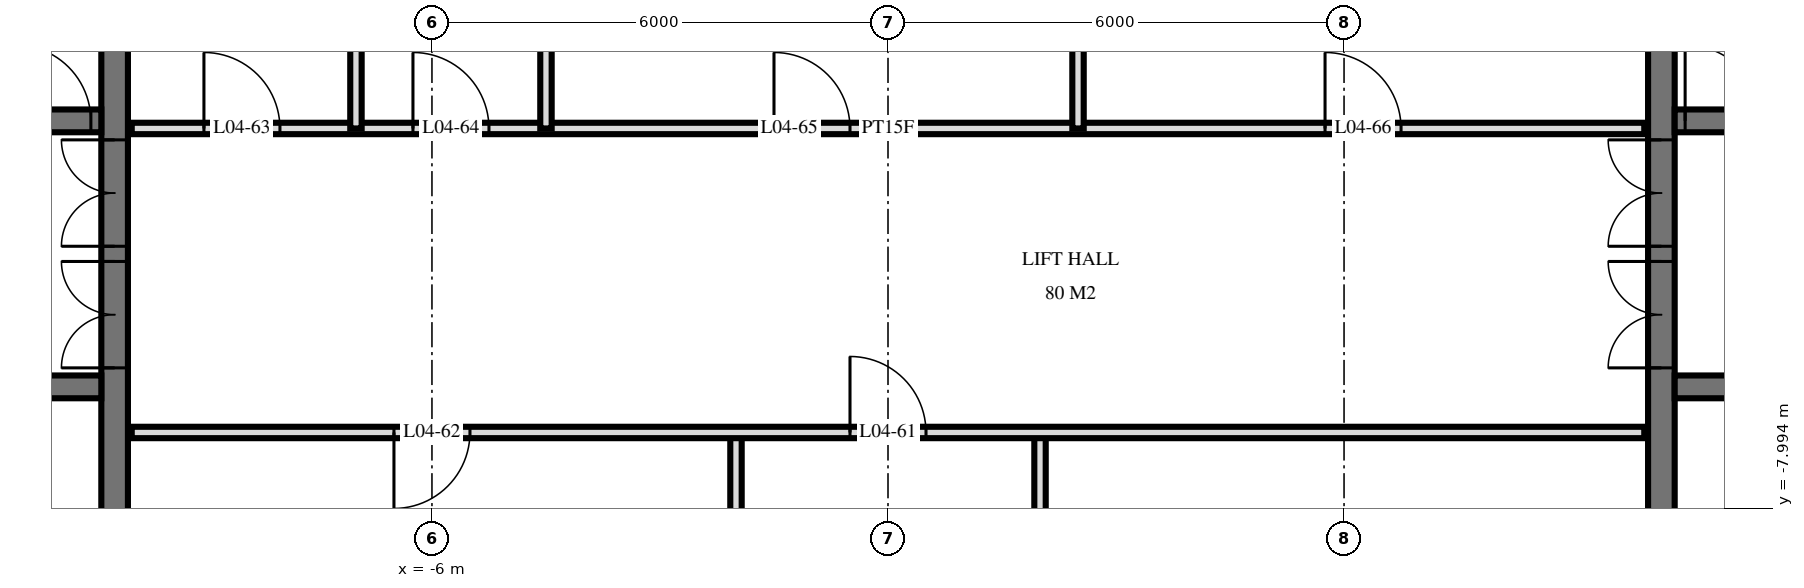
"""IFC4 building model, lengths in metres.
Left out: names, types, materials, properties, quantities, classifications, styles, units other than length and angle.
Written with IfcOpenShell. Run it as: python <this file> out.ifc"""

import sys

from ifc_helpers import new_model, si_unit, direction, frame, frame_2d, origin, place, context, subcontext, project, spatial, rectangle, extrude, element, fill, save


model = new_model("IFC4")
c1 = context("Model", 3, precision=1e-05, world=origin(), true_north=direction((0.0, 1.0)))
c2 = subcontext(c1, "Body", "Model", "MODEL_VIEW")
j1 = project(units=[si_unit("LENGTHUNIT", "METRE"), si_unit("PLANEANGLEUNIT", "RADIAN")], contexts=[c1])
p1 = place(None, origin())
s1 = spatial("IfcSite", under=j1, at=p1, CompositionType="ELEMENT")
p2 = place(p1, origin())
s2 = spatial("IfcBuilding", under=s1, at=p2, CompositionType="ELEMENT")
p3 = place(p2, frame((0.0, 0.0, 24.0)))
s3 = spatial("IfcBuildingStorey", under=s2, at=p3, CompositionType="ELEMENT", Elevation=24.0)
p4 = place(p3, frame((-10.175, -14.55, 0.0), z_axis=(0.0, 0.0, 1.0), x_axis=(0.0, 1.0, 0.0)))
e1 = element("IfcWall", 1, at=p4, inside=s3, PredefinedType="SHEAR", context=c2, shape_type="SweptSolid", body=[
    extrude(rectangle(XDim=14.1, YDim=0.35, at=frame_2d((7.05, 0.0))), origin(), (0.0, 0.0, 1.0), 3.6),
])
p5 = place(p4, frame((8.4, 0.0, 0.0)))
e2 = element("IfcOpeningElement", 2, at=p5, cuts=e1, PredefinedType="OPENING", context=c2, shape_type="SweptSolid", body=[
    extrude(rectangle(XDim=1.4, YDim=2.4, at=frame_2d((0.7, 1.2))), frame((0.0, 0.185, 0.0), z_axis=(0.0, -1.0, 0.0), x_axis=(1.0, 0.0, 0.0)), (0.0, 0.0, 1.0), 0.37),
])
p6 = place(p4, frame((10.0, 0.0, 0.0)))
e3 = element("IfcOpeningElement", 3, at=p6, cuts=e1, PredefinedType="OPENING", context=c2, shape_type="SweptSolid", body=[
    extrude(rectangle(XDim=1.4, YDim=2.4, at=frame_2d((0.7, 1.2))), frame((0.0, 0.185, 0.0), z_axis=(0.0, -1.0, 0.0), x_axis=(1.0, 0.0, 0.0)), (0.0, 0.0, 1.0), 0.37),
])
p7 = place(p4, frame((4.0, 0.0, 0.0)))
e4 = element("IfcOpeningElement", 4, at=p7, cuts=e1, PredefinedType="OPENING", context=c2, shape_type="SweptSolid", body=[
    extrude(rectangle(XDim=1.2, YDim=2.1, at=frame_2d((0.6, 1.05))), frame((0.0, 0.185, 0.0), z_axis=(0.0, -1.0, 0.0), x_axis=(1.0, 0.0, 0.0)), (0.0, 0.0, 1.0), 0.37),
])
p8 = place(p3, frame((-29.05, -2.9, 0.0), z_axis=(0.0, 0.0, 1.0), x_axis=(1.0, 0.0, 0.0)))
e5 = element("IfcWall", 5, at=p8, inside=s3, PredefinedType="SHEAR", context=c2, shape_type="SweptSolid", body=[
    extrude(rectangle(XDim=18.7, YDim=0.3, at=frame_2d((9.35, 0.0))), origin(), (0.0, 0.0, 1.0), 3.6),
])
p9 = place(p8, frame((2.95, 0.0, 0.0)))
e6 = element("IfcOpeningElement", 6, at=p9, cuts=e5, PredefinedType="OPENING", context=c2, shape_type="SweptSolid", body=[
    extrude(rectangle(XDim=1.1, YDim=2.1, at=frame_2d((0.55, 1.05))), frame((0.0, 0.16, 0.0), z_axis=(0.0, -1.0, 0.0), x_axis=(1.0, 0.0, 0.0)), (0.0, 0.0, 1.0), 0.32),
])
p10 = place(p8, frame((0.55, 0.0, 0.0)))
e7 = element("IfcOpeningElement", 7, at=p10, cuts=e5, PredefinedType="OPENING", context=c2, shape_type="SweptSolid", body=[
    extrude(rectangle(XDim=1.1, YDim=2.1, at=frame_2d((0.55, 1.05))), frame((0.0, 0.16, 0.0), z_axis=(0.0, -1.0, 0.0), x_axis=(1.0, 0.0, 0.0)), (0.0, 0.0, 1.0), 0.32),
])
p11 = place(p8, frame((11.613, 0.0, 0.0)))
e8 = element("IfcOpeningElement", 8, at=p11, cuts=e5, PredefinedType="OPENING", context=c2, shape_type="SweptSolid", body=[
    extrude(rectangle(XDim=0.9, YDim=2.1, at=frame_2d((0.45, 1.05))), frame((0.0, 0.16, 0.0), z_axis=(0.0, -1.0, 0.0), x_axis=(1.0, 0.0, 0.0)), (0.0, 0.0, 1.0), 0.32),
])
p12 = place(p8, frame((10.188, 0.0, 0.0)))
e9 = element("IfcOpeningElement", 9, at=p12, cuts=e5, PredefinedType="OPENING", context=c2, shape_type="SweptSolid", body=[
    extrude(rectangle(XDim=0.9, YDim=2.1, at=frame_2d((0.45, 1.05))), frame((0.0, 0.16, 0.0), z_axis=(0.0, -1.0, 0.0), x_axis=(1.0, 0.0, 0.0)), (0.0, 0.0, 1.0), 0.32),
])
p13 = place(p8, frame((17.562, 0.0, 0.0)))
e10 = element("IfcOpeningElement", 10, at=p13, cuts=e5, PredefinedType="OPENING", context=c2, shape_type="SweptSolid", body=[
    extrude(rectangle(XDim=1.0, YDim=2.1, at=frame_2d((0.5, 1.05))), frame((0.0, 0.16, 0.0), z_axis=(0.0, -1.0, 0.0), x_axis=(1.0, 0.0, 0.0)), (0.0, 0.0, 1.0), 0.32),
])
p14 = place(p8, frame((16.137, 0.0, 0.0)))
e11 = element("IfcOpeningElement", 11, at=p14, cuts=e5, PredefinedType="OPENING", context=c2, shape_type="SweptSolid", body=[
    extrude(rectangle(XDim=1.0, YDim=2.1, at=frame_2d((0.5, 1.05))), frame((0.0, 0.16, 0.0), z_axis=(0.0, -1.0, 0.0), x_axis=(1.0, 0.0, 0.0)), (0.0, 0.0, 1.0), 0.32),
])
p15 = place(p8, frame((13.85, 0.0, 0.0)))
e12 = element("IfcOpeningElement", 12, at=p15, cuts=e5, PredefinedType="OPENING", context=c2, shape_type="SweptSolid", body=[
    extrude(rectangle(XDim=1.0, YDim=2.1, at=frame_2d((0.5, 1.05))), frame((0.0, 0.16, 0.0), z_axis=(0.0, -1.0, 0.0), x_axis=(1.0, 0.0, 0.0)), (0.0, 0.0, 1.0), 0.32),
])
p16 = place(p8, frame((5.6, 0.0, 0.0)))
e13 = element("IfcOpeningElement", 13, at=p16, cuts=e5, PredefinedType="OPENING", context=c2, shape_type="SweptSolid", body=[
    extrude(rectangle(XDim=1.0, YDim=2.1, at=frame_2d((0.5, 1.05))), frame((0.0, 0.16, 0.0), z_axis=(0.0, -1.0, 0.0), x_axis=(1.0, 0.0, 0.0)), (0.0, 0.0, 1.0), 0.32),
])
p17 = place(p3, frame((-29.05, -6.4, 0.0), z_axis=(0.0, 0.0, 1.0), x_axis=(1.0, 0.0, 0.0)))
e14 = element("IfcWall", 14, at=p17, inside=s3, PredefinedType="SHEAR", context=c2, shape_type="SweptSolid", body=[
    extrude(rectangle(XDim=18.7, YDim=0.3, at=frame_2d((9.35, 0.0))), origin(), (0.0, 0.0, 1.0), 3.6),
])
p18 = place(p17, frame((2.95, 0.0, 0.0)))
e15 = element("IfcOpeningElement", 15, at=p18, cuts=e14, PredefinedType="OPENING", context=c2, shape_type="SweptSolid", body=[
    extrude(rectangle(XDim=1.1, YDim=2.1, at=frame_2d((0.55, 1.05))), frame((0.0, 0.16, 0.0), z_axis=(0.0, -1.0, 0.0), x_axis=(1.0, 0.0, 0.0)), (0.0, 0.0, 1.0), 0.32),
])
p19 = place(p17, frame((0.55, 0.0, 0.0)))
e16 = element("IfcOpeningElement", 16, at=p19, cuts=e14, PredefinedType="OPENING", context=c2, shape_type="SweptSolid", body=[
    extrude(rectangle(XDim=1.1, YDim=2.1, at=frame_2d((0.55, 1.05))), frame((0.0, 0.16, 0.0), z_axis=(0.0, -1.0, 0.0), x_axis=(1.0, 0.0, 0.0)), (0.0, 0.0, 1.0), 0.32),
])
p20 = place(p17, frame((10.8, 0.0, 0.0)))
e17 = element("IfcOpeningElement", 17, at=p20, cuts=e14, PredefinedType="OPENING", context=c2, shape_type="SweptSolid", body=[
    extrude(rectangle(XDim=1.1, YDim=2.1, at=frame_2d((0.55, 1.05))), frame((0.0, 0.16, 0.0), z_axis=(0.0, -1.0, 0.0), x_axis=(1.0, 0.0, 0.0)), (0.0, 0.0, 1.0), 0.32),
])
p21 = place(p17, frame((5.6, 0.0, 0.0)))
e18 = element("IfcOpeningElement", 18, at=p21, cuts=e14, PredefinedType="OPENING", context=c2, shape_type="SweptSolid", body=[
    extrude(rectangle(XDim=1.0, YDim=2.1, at=frame_2d((0.5, 1.05))), frame((0.0, 0.16, 0.0), z_axis=(0.0, -1.0, 0.0), x_axis=(1.0, 0.0, 0.0)), (0.0, 0.0, 1.0), 0.32),
])
p22 = place(p3, frame((10.175, -14.55, 0.0), z_axis=(0.0, 0.0, 1.0), x_axis=(0.0, 1.0, 0.0)))
e19 = element("IfcWall", 19, at=p22, inside=s3, PredefinedType="SHEAR", context=c2, shape_type="SweptSolid", body=[
    extrude(rectangle(XDim=14.1, YDim=0.35, at=frame_2d((7.05, 0.0))), origin(), (0.0, 0.0, 1.0), 3.6),
])
p23 = place(p22, frame((8.4, 0.0, 0.0)))
e20 = element("IfcOpeningElement", 20, at=p23, cuts=e19, PredefinedType="OPENING", context=c2, shape_type="SweptSolid", body=[
    extrude(rectangle(XDim=1.4, YDim=2.4, at=frame_2d((0.7, 1.2))), frame((0.0, 0.185, 0.0), z_axis=(0.0, -1.0, 0.0), x_axis=(1.0, 0.0, 0.0)), (0.0, 0.0, 1.0), 0.37),
])
p24 = place(p22, frame((10.0, 0.0, 0.0)))
e21 = element("IfcOpeningElement", 21, at=p24, cuts=e19, PredefinedType="OPENING", context=c2, shape_type="SweptSolid", body=[
    extrude(rectangle(XDim=1.4, YDim=2.4, at=frame_2d((0.7, 1.2))), frame((0.0, 0.185, 0.0), z_axis=(0.0, -1.0, 0.0), x_axis=(1.0, 0.0, 0.0)), (0.0, 0.0, 1.0), 0.37),
])
p25 = place(p22, frame((4.0, 0.0, 0.0)))
e22 = element("IfcOpeningElement", 22, at=p25, cuts=e19, PredefinedType="OPENING", context=c2, shape_type="SweptSolid", body=[
    extrude(rectangle(XDim=1.2, YDim=2.1, at=frame_2d((0.6, 1.05))), frame((0.0, 0.185, 0.0), z_axis=(0.0, -1.0, 0.0), x_axis=(1.0, 0.0, 0.0)), (0.0, 0.0, 1.0), 0.37),
])
p26 = place(p3, frame((10.35, -2.9, 0.0), z_axis=(0.0, 0.0, 1.0), x_axis=(1.0, 0.0, 0.0)))
e23 = element("IfcWall", 23, at=p26, inside=s3, PredefinedType="SHEAR", context=c2, shape_type="SweptSolid", body=[
    extrude(rectangle(XDim=18.7, YDim=0.3, at=frame_2d((9.35, 0.0))), origin(), (0.0, 0.0, 1.0), 3.6),
])
p27 = place(p26, frame((14.65, 0.0, 0.0)))
e24 = element("IfcOpeningElement", 24, at=p27, cuts=e23, PredefinedType="OPENING", context=c2, shape_type="SweptSolid", body=[
    extrude(rectangle(XDim=1.1, YDim=2.1, at=frame_2d((0.55, 1.05))), frame((0.0, 0.16, 0.0), z_axis=(0.0, -1.0, 0.0), x_axis=(1.0, 0.0, 0.0)), (0.0, 0.0, 1.0), 0.32),
])
p28 = place(p26, frame((17.05, 0.0, 0.0)))
e25 = element("IfcOpeningElement", 25, at=p28, cuts=e23, PredefinedType="OPENING", context=c2, shape_type="SweptSolid", body=[
    extrude(rectangle(XDim=1.1, YDim=2.1, at=frame_2d((0.55, 1.05))), frame((0.0, 0.16, 0.0), z_axis=(0.0, -1.0, 0.0), x_axis=(1.0, 0.0, 0.0)), (0.0, 0.0, 1.0), 0.32),
])
p29 = place(p26, frame((6.188, 0.0, 0.0)))
e26 = element("IfcOpeningElement", 26, at=p29, cuts=e23, PredefinedType="OPENING", context=c2, shape_type="SweptSolid", body=[
    extrude(rectangle(XDim=0.9, YDim=2.1, at=frame_2d((0.45, 1.05))), frame((0.0, 0.16, 0.0), z_axis=(0.0, -1.0, 0.0), x_axis=(1.0, 0.0, 0.0)), (0.0, 0.0, 1.0), 0.32),
])
p30 = place(p26, frame((7.613, 0.0, 0.0)))
e27 = element("IfcOpeningElement", 27, at=p30, cuts=e23, PredefinedType="OPENING", context=c2, shape_type="SweptSolid", body=[
    extrude(rectangle(XDim=0.9, YDim=2.1, at=frame_2d((0.45, 1.05))), frame((0.0, 0.16, 0.0), z_axis=(0.0, -1.0, 0.0), x_axis=(1.0, 0.0, 0.0)), (0.0, 0.0, 1.0), 0.32),
])
p31 = place(p26, frame((0.137, 0.0, 0.0)))
e28 = element("IfcOpeningElement", 28, at=p31, cuts=e23, PredefinedType="OPENING", context=c2, shape_type="SweptSolid", body=[
    extrude(rectangle(XDim=1.0, YDim=2.1, at=frame_2d((0.5, 1.05))), frame((0.0, 0.16, 0.0), z_axis=(0.0, -1.0, 0.0), x_axis=(1.0, 0.0, 0.0)), (0.0, 0.0, 1.0), 0.32),
])
p32 = place(p26, frame((1.562, 0.0, 0.0)))
e29 = element("IfcOpeningElement", 29, at=p32, cuts=e23, PredefinedType="OPENING", context=c2, shape_type="SweptSolid", body=[
    extrude(rectangle(XDim=1.0, YDim=2.1, at=frame_2d((0.5, 1.05))), frame((0.0, 0.16, 0.0), z_axis=(0.0, -1.0, 0.0), x_axis=(1.0, 0.0, 0.0)), (0.0, 0.0, 1.0), 0.32),
])
p33 = place(p26, frame((3.85, 0.0, 0.0)))
e30 = element("IfcOpeningElement", 30, at=p33, cuts=e23, PredefinedType="OPENING", context=c2, shape_type="SweptSolid", body=[
    extrude(rectangle(XDim=1.0, YDim=2.1, at=frame_2d((0.5, 1.05))), frame((0.0, 0.16, 0.0), z_axis=(0.0, -1.0, 0.0), x_axis=(1.0, 0.0, 0.0)), (0.0, 0.0, 1.0), 0.32),
])
p34 = place(p26, frame((12.1, 0.0, 0.0)))
e31 = element("IfcOpeningElement", 31, at=p34, cuts=e23, PredefinedType="OPENING", context=c2, shape_type="SweptSolid", body=[
    extrude(rectangle(XDim=1.0, YDim=2.1, at=frame_2d((0.5, 1.05))), frame((0.0, 0.16, 0.0), z_axis=(0.0, -1.0, 0.0), x_axis=(1.0, 0.0, 0.0)), (0.0, 0.0, 1.0), 0.32),
])
p35 = place(p3, frame((10.35, -6.4, 0.0), z_axis=(0.0, 0.0, 1.0), x_axis=(1.0, 0.0, 0.0)))
e32 = element("IfcWall", 32, at=p35, inside=s3, PredefinedType="SHEAR", context=c2, shape_type="SweptSolid", body=[
    extrude(rectangle(XDim=18.7, YDim=0.3, at=frame_2d((9.35, 0.0))), origin(), (0.0, 0.0, 1.0), 3.6),
])
p36 = place(p35, frame((14.65, 0.0, 0.0)))
e33 = element("IfcOpeningElement", 33, at=p36, cuts=e32, PredefinedType="OPENING", context=c2, shape_type="SweptSolid", body=[
    extrude(rectangle(XDim=1.1, YDim=2.1, at=frame_2d((0.55, 1.05))), frame((0.0, 0.16, 0.0), z_axis=(0.0, -1.0, 0.0), x_axis=(1.0, 0.0, 0.0)), (0.0, 0.0, 1.0), 0.32),
])
p37 = place(p35, frame((17.05, 0.0, 0.0)))
e34 = element("IfcOpeningElement", 34, at=p37, cuts=e32, PredefinedType="OPENING", context=c2, shape_type="SweptSolid", body=[
    extrude(rectangle(XDim=1.1, YDim=2.1, at=frame_2d((0.55, 1.05))), frame((0.0, 0.16, 0.0), z_axis=(0.0, -1.0, 0.0), x_axis=(1.0, 0.0, 0.0)), (0.0, 0.0, 1.0), 0.32),
])
p38 = place(p35, frame((6.8, 0.0, 0.0)))
e35 = element("IfcOpeningElement", 35, at=p38, cuts=e32, PredefinedType="OPENING", context=c2, shape_type="SweptSolid", body=[
    extrude(rectangle(XDim=1.1, YDim=2.1, at=frame_2d((0.55, 1.05))), frame((0.0, 0.16, 0.0), z_axis=(0.0, -1.0, 0.0), x_axis=(1.0, 0.0, 0.0)), (0.0, 0.0, 1.0), 0.32),
])
p39 = place(p35, frame((12.1, 0.0, 0.0)))
e36 = element("IfcOpeningElement", 36, at=p39, cuts=e32, PredefinedType="OPENING", context=c2, shape_type="SweptSolid", body=[
    extrude(rectangle(XDim=1.0, YDim=2.1, at=frame_2d((0.5, 1.05))), frame((0.0, 0.16, 0.0), z_axis=(0.0, -1.0, 0.0), x_axis=(1.0, 0.0, 0.0)), (0.0, 0.0, 1.0), 0.32),
])
p40 = place(p3, frame((2.5, -3.0, 0.0), z_axis=(0.0, 0.0, 1.0), x_axis=(0.0, 1.0, 0.0)))
e37 = element("IfcWall", 37, at=p40, inside=s3, PredefinedType="PARTITIONING", context=c2, shape_type="SweptSolid", body=[
    extrude(rectangle(XDim=4.02, YDim=0.15, at=frame_2d((2.01, 0.0))), origin(), (0.0, 0.0, 1.0), 3.32),
])
for number, where, z_axis, x_axis in (
    (38, (2.0, -11.0, 0.0), (0.0, 0.0, 1.0), (0.0, 1.0, 0.0)),
    (39, (-2.0, -11.0, 0.0), (0.0, 0.0, 1.0), (0.0, 1.0, 0.0)),
):
    element("IfcWall", number, at=place(p3, frame(where, z_axis=z_axis, x_axis=x_axis)), inside=s3, PredefinedType="PARTITIONING", context=c2, shape_type="SweptSolid", body=[
        extrude(rectangle(XDim=4.0, YDim=0.15, at=frame_2d((2.0, 0.0))), origin(), (0.0, 0.0, 1.0), 3.32),
    ])
for number, where, z_axis, x_axis in (
    (40, (-4.5, -3.0, 0.0), (0.0, 0.0, 1.0), (0.0, 1.0, 0.0)),
    (41, (-7.0, -3.0, 0.0), (0.0, 0.0, 1.0), (0.0, 1.0, 0.0)),
):
    element("IfcWall", number, at=place(p3, frame(where, z_axis=z_axis, x_axis=x_axis)), inside=s3, PredefinedType="PLUMBINGWALL", context=c2, shape_type="SweptSolid", body=[
        extrude(rectangle(XDim=4.02, YDim=0.15, at=frame_2d((2.01, 0.0))), origin(), (0.0, 0.0, 1.0), 3.32),
    ])
p41 = place(p3, frame((-9.95, -7.0, 0.0), z_axis=(0.0, 0.0, 1.0), x_axis=(1.0, 0.0, 0.0)))
e42 = element("IfcWall", 42, at=p41, inside=s3, PredefinedType="PARTITIONING", context=c2, shape_type="SweptSolid", body=[
    extrude(rectangle(XDim=19.9, YDim=0.15, at=frame_2d((9.95, 0.0))), origin(), (0.0, 0.0, 1.0), 3.32),
])
p42 = place(p41, frame((9.45, 0.0, 0.0)))
e43 = element("IfcOpeningElement", 43, at=p42, cuts=e42, PredefinedType="OPENING", context=c2, shape_type="SweptSolid", body=[
    extrude(rectangle(XDim=1.0, YDim=2.1, at=frame_2d((0.5, 1.05))), frame((0.0, 0.085, 0.0), z_axis=(0.0, -1.0, 0.0), x_axis=(1.0, 0.0, 0.0)), (0.0, 0.0, 1.0), 0.17),
])
p43 = place(p41, frame((3.45, 0.0, 0.0)))
e44 = element("IfcOpeningElement", 44, at=p43, cuts=e42, PredefinedType="OPENING", context=c2, shape_type="SweptSolid", body=[
    extrude(rectangle(XDim=1.0, YDim=2.1, at=frame_2d((0.5, 1.05))), frame((0.0, 0.085, 0.0), z_axis=(0.0, -1.0, 0.0), x_axis=(1.0, 0.0, 0.0)), (0.0, 0.0, 1.0), 0.17),
])
p44 = place(p3, frame((-9.95, -3.0, 0.0), z_axis=(0.0, 0.0, 1.0), x_axis=(1.0, 0.0, 0.0)))
e45 = element("IfcWall", 45, at=p44, inside=s3, PredefinedType="PARTITIONING", context=c2, shape_type="SweptSolid", body=[
    extrude(rectangle(XDim=19.9, YDim=0.15, at=frame_2d((9.95, 0.0))), origin(), (0.0, 0.0, 1.0), 3.32),
])
p45 = place(p44, frame((0.95, 0.0, 0.0)))
e46 = element("IfcOpeningElement", 46, at=p45, cuts=e45, PredefinedType="OPENING", context=c2, shape_type="SweptSolid", body=[
    extrude(rectangle(XDim=1.0, YDim=2.1, at=frame_2d((0.5, 1.05))), frame((0.0, 0.085, 0.0), z_axis=(0.0, -1.0, 0.0), x_axis=(1.0, 0.0, 0.0)), (0.0, 0.0, 1.0), 0.17),
])
p46 = place(p44, frame((3.7, 0.0, 0.0)))
e47 = element("IfcOpeningElement", 47, at=p46, cuts=e45, PredefinedType="OPENING", context=c2, shape_type="SweptSolid", body=[
    extrude(rectangle(XDim=1.0, YDim=2.1, at=frame_2d((0.5, 1.05))), frame((0.0, 0.085, 0.0), z_axis=(0.0, -1.0, 0.0), x_axis=(1.0, 0.0, 0.0)), (0.0, 0.0, 1.0), 0.17),
])
p47 = place(p44, frame((8.45, 0.0, 0.0)))
e48 = element("IfcOpeningElement", 48, at=p47, cuts=e45, PredefinedType="OPENING", context=c2, shape_type="SweptSolid", body=[
    extrude(rectangle(XDim=1.0, YDim=2.1, at=frame_2d((0.5, 1.05))), frame((0.0, 0.085, 0.0), z_axis=(0.0, -1.0, 0.0), x_axis=(1.0, 0.0, 0.0)), (0.0, 0.0, 1.0), 0.17),
])
p48 = place(p44, frame((15.7, 0.0, 0.0)))
e49 = element("IfcOpeningElement", 49, at=p48, cuts=e45, PredefinedType="OPENING", context=c2, shape_type="SweptSolid", body=[
    extrude(rectangle(XDim=1.0, YDim=2.1, at=frame_2d((0.5, 1.05))), frame((0.0, 0.085, 0.0), z_axis=(0.0, -1.0, 0.0), x_axis=(1.0, 0.0, 0.0)), (0.0, 0.0, 1.0), 0.17),
])
p49 = place(p5, origin())
e50 = element("IfcDoor", 50, at=p49, inside=s3, OperationType="DOUBLE_DOOR_SINGLE_SWING", PredefinedType="DOOR", context=c2, shape_type="SweptSolid", body=[
    extrude(rectangle(XDim=1.4, YDim=2.4, at=frame_2d((0.7, 1.2))), frame((0.0, 0.025, 0.0), z_axis=(0.0, -1.0, 0.0), x_axis=(1.0, 0.0, 0.0)), (0.0, 0.0, 1.0), 0.05),
])
fill(e2, e50)
p50 = place(p6, origin())
e51 = element("IfcDoor", 51, at=p50, inside=s3, OperationType="DOUBLE_DOOR_SINGLE_SWING", PredefinedType="DOOR", context=c2, shape_type="SweptSolid", body=[
    extrude(rectangle(XDim=1.4, YDim=2.4, at=frame_2d((0.7, 1.2))), frame((0.0, 0.025, 0.0), z_axis=(0.0, -1.0, 0.0), x_axis=(1.0, 0.0, 0.0)), (0.0, 0.0, 1.0), 0.05),
])
fill(e3, e51)
p51 = place(p13, origin())
e52 = element("IfcDoor", 52, at=p51, inside=s3, OperationType="SINGLE_SWING_RIGHT", PredefinedType="DOOR", context=c2, shape_type="SweptSolid", body=[
    extrude(rectangle(XDim=1.0, YDim=2.1, at=frame_2d((0.5, 1.05))), frame((0.0, 0.025, 0.0), z_axis=(0.0, -1.0, 0.0), x_axis=(1.0, 0.0, 0.0)), (0.0, 0.0, 1.0), 0.05),
])
fill(e10, e52)
p52 = place(p23, origin())
e53 = element("IfcDoor", 53, at=p52, inside=s3, OperationType="DOUBLE_DOOR_SINGLE_SWING", PredefinedType="DOOR", context=c2, shape_type="SweptSolid", body=[
    extrude(rectangle(XDim=1.4, YDim=2.4, at=frame_2d((0.7, 1.2))), frame((0.0, 0.025, 0.0), z_axis=(0.0, -1.0, 0.0), x_axis=(1.0, 0.0, 0.0)), (0.0, 0.0, 1.0), 0.05),
])
fill(e20, e53)
p53 = place(p24, origin())
e54 = element("IfcDoor", 54, at=p53, inside=s3, OperationType="DOUBLE_DOOR_SINGLE_SWING", PredefinedType="DOOR", context=c2, shape_type="SweptSolid", body=[
    extrude(rectangle(XDim=1.4, YDim=2.4, at=frame_2d((0.7, 1.2))), frame((0.0, 0.025, 0.0), z_axis=(0.0, -1.0, 0.0), x_axis=(1.0, 0.0, 0.0)), (0.0, 0.0, 1.0), 0.05),
])
fill(e21, e54)
p54 = place(p31, origin())
e55 = element("IfcDoor", 55, at=p54, inside=s3, OperationType="SINGLE_SWING_RIGHT", PredefinedType="DOOR", context=c2, shape_type="SweptSolid", body=[
    extrude(rectangle(XDim=1.0, YDim=2.1, at=frame_2d((0.5, 1.05))), frame((0.0, 0.025, 0.0), z_axis=(0.0, -1.0, 0.0), x_axis=(1.0, 0.0, 0.0)), (0.0, 0.0, 1.0), 0.05),
])
fill(e28, e55)
p55 = place(p42, origin())
e56 = element("IfcDoor", 56, at=p55, inside=s3, OperationType="SINGLE_SWING_RIGHT", PredefinedType="DOOR", context=c2, shape_type="SweptSolid", body=[
    extrude(rectangle(XDim=1.0, YDim=2.1, at=frame_2d((0.5, 1.05))), frame((0.0, 0.025, 0.0), z_axis=(0.0, -1.0, 0.0), x_axis=(1.0, 0.0, 0.0)), (0.0, 0.0, 1.0), 0.05),
])
fill(e43, e56)
p56 = place(p43, frame((0.5, 0.0, 0.0), z_axis=(0.0, 0.0, 1.0), x_axis=(-1.0, 0.0, 0.0)))
e57 = element("IfcDoor", 57, at=p56, inside=s3, OperationType="SINGLE_SWING_LEFT", PredefinedType="DOOR", context=c2, shape_type="SweptSolid", body=[
    extrude(rectangle(XDim=1.0, YDim=2.1, at=frame_2d((0.0, 1.05))), frame((0.0, -0.025, 0.0), z_axis=(0.0, 1.0, 0.0), x_axis=(-1.0, 0.0, 0.0)), (0.0, 0.0, 1.0), 0.05),
])
fill(e44, e57)
p57 = place(p45, origin())
e58 = element("IfcDoor", 58, at=p57, inside=s3, OperationType="SINGLE_SWING_RIGHT", PredefinedType="DOOR", context=c2, shape_type="SweptSolid", body=[
    extrude(rectangle(XDim=1.0, YDim=2.1, at=frame_2d((0.5, 1.05))), frame((0.0, 0.025, 0.0), z_axis=(0.0, -1.0, 0.0), x_axis=(1.0, 0.0, 0.0)), (0.0, 0.0, 1.0), 0.05),
])
fill(e46, e58)
p58 = place(p46, origin())
e59 = element("IfcDoor", 59, at=p58, inside=s3, OperationType="SINGLE_SWING_RIGHT", PredefinedType="DOOR", context=c2, shape_type="SweptSolid", body=[
    extrude(rectangle(XDim=1.0, YDim=2.1, at=frame_2d((0.5, 1.05))), frame((0.0, 0.025, 0.0), z_axis=(0.0, -1.0, 0.0), x_axis=(1.0, 0.0, 0.0)), (0.0, 0.0, 1.0), 0.05),
])
fill(e47, e59)
p59 = place(p47, origin())
e60 = element("IfcDoor", 60, at=p59, inside=s3, OperationType="SINGLE_SWING_RIGHT", PredefinedType="DOOR", context=c2, shape_type="SweptSolid", body=[
    extrude(rectangle(XDim=1.0, YDim=2.1, at=frame_2d((0.5, 1.05))), frame((0.0, 0.025, 0.0), z_axis=(0.0, -1.0, 0.0), x_axis=(1.0, 0.0, 0.0)), (0.0, 0.0, 1.0), 0.05),
])
fill(e48, e60)
p60 = place(p48, origin())
e61 = element("IfcDoor", 61, at=p60, inside=s3, OperationType="SINGLE_SWING_RIGHT", PredefinedType="DOOR", context=c2, shape_type="SweptSolid", body=[
    extrude(rectangle(XDim=1.0, YDim=2.1, at=frame_2d((0.5, 1.05))), frame((0.0, 0.025, 0.0), z_axis=(0.0, -1.0, 0.0), x_axis=(1.0, 0.0, 0.0)), (0.0, 0.0, 1.0), 0.05),
])
fill(e49, e61)
save(model, sys.argv[1])
